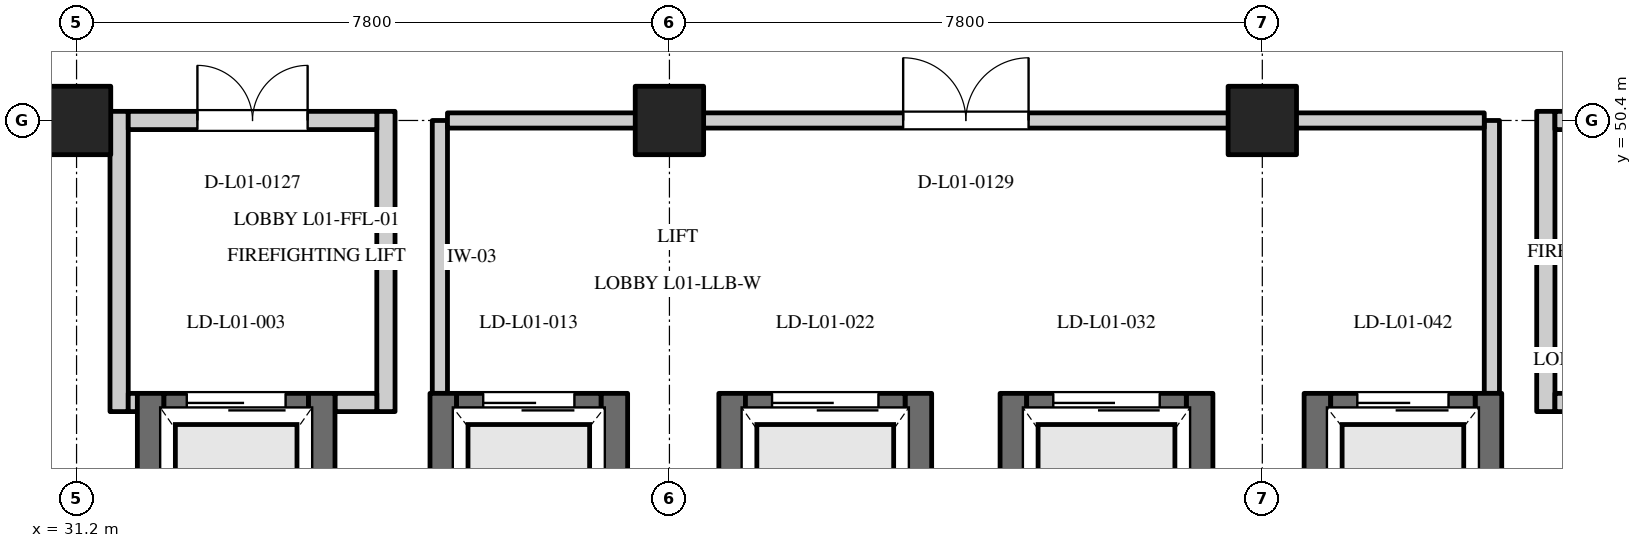
"""IFC4 building model, lengths in metres.
Left out: names, types, materials, properties, quantities, classifications, styles, units other than length and angle.
Written with IfcOpenShell. Run it as: python <this file> out.ifc"""

import sys

from ifc_helpers import new_model, si_unit, direction, frame, frame_2d, origin, origin_2d, place, context, subcontext, project, spatial, rectangle, extrude, element, fill, save


model = new_model("IFC4")
c1 = context("Model", 3, precision=1e-05, world=origin(), true_north=direction((0.0, 1.0)))
c2 = subcontext(c1, "Body", "Model", "MODEL_VIEW")
j1 = project(units=[si_unit("LENGTHUNIT", "METRE"), si_unit("PLANEANGLEUNIT", "RADIAN")], contexts=[c1])
p1 = place(None, origin())
s1 = spatial("IfcSite", under=j1, at=p1, CompositionType="ELEMENT")
p2 = place(p1, origin())
s2 = spatial("IfcBuilding", under=s1, at=p2, CompositionType="ELEMENT")
p3 = place(p2, frame((0.0, 0.0, 4.8)))
s3 = spatial("IfcBuildingStorey", under=s2, at=p3, CompositionType="ELEMENT", Elevation=4.8)
for number, where, z_axis, x_axis in (
    (1, (31.2, 50.4, 0.0), (0.0, 0.0, 1.0), (1.0, 0.0, 0.0)),
    (2, (39.0, 50.4, 0.0), (0.0, 0.0, 1.0), (1.0, 0.0, 0.0)),
    (3, (46.8, 50.4, 0.0), (0.0, 0.0, 1.0), (1.0, 0.0, 0.0)),
):
    element("IfcColumn", number, at=place(p3, frame(where, z_axis=z_axis, x_axis=x_axis)), inside=s3, PredefinedType="COLUMN", context=c2, shape_type="SweptSolid", body=[
        extrude(rectangle(XDim=0.9, YDim=0.9, at=origin_2d()), origin(), (0.0, 0.0, 1.0), 4.8),
    ])
for number, where, z_axis, x_axis in (
    (4, (32.175, 43.06, 0.0), (0.0, 0.0, 1.0), (0.0, 1.0, 0.0)),
    (5, (34.425, 43.06, 0.0), (0.0, 0.0, 1.0), (0.0, 1.0, 0.0)),
):
    element("IfcWall", number, at=place(p3, frame(where, z_axis=z_axis, x_axis=x_axis)), inside=s3, PredefinedType="SHEAR", context=c2, shape_type="SweptSolid", body=[
        extrude(rectangle(XDim=3.75, YDim=0.35, at=frame_2d((1.875, 0.0))), origin(), (0.0, 0.0, 1.0), 4.8),
    ])
p4 = place(p3, frame((32.35, 46.635, 0.0), z_axis=(0.0, 0.0, 1.0), x_axis=(1.0, 0.0, 0.0)))
e6 = element("IfcWall", 6, at=p4, inside=s3, PredefinedType="SHEAR", context=c2, shape_type="SweptSolid", body=[
    extrude(rectangle(XDim=1.9, YDim=0.35, at=frame_2d((0.95, 0.0))), origin(), (0.0, 0.0, 1.0), 4.45),
])
p5 = place(p4, frame((0.3, 0.0, 0.0)))
e7 = element("IfcOpeningElement", 7, at=p5, cuts=e6, PredefinedType="OPENING", context=c2, shape_type="SweptSolid", body=[
    extrude(rectangle(XDim=1.3, YDim=2.2, at=frame_2d((0.65, 1.1))), frame((0.0, 0.187, 0.0), z_axis=(0.0, -1.0, 0.0), x_axis=(1.0, 0.0, 0.0)), (0.0, 0.0, 1.0), 0.374),
])
for number, where, z_axis, x_axis in (
    (8, (36.025, 43.36, 0.0), (0.0, 0.0, 1.0), (0.0, 1.0, 0.0)),
    (9, (38.275, 43.36, 0.0), (0.0, 0.0, 1.0), (0.0, 1.0, 0.0)),
):
    element("IfcWall", number, at=place(p3, frame(where, z_axis=z_axis, x_axis=x_axis)), inside=s3, PredefinedType="SHEAR", context=c2, shape_type="SweptSolid", body=[
        extrude(rectangle(XDim=3.45, YDim=0.35, at=frame_2d((1.725, 0.0))), origin(), (0.0, 0.0, 1.0), 4.8),
    ])
p6 = place(p3, frame((36.2, 46.635, 0.0), z_axis=(0.0, 0.0, 1.0), x_axis=(1.0, 0.0, 0.0)))
e10 = element("IfcWall", 10, at=p6, inside=s3, PredefinedType="SHEAR", context=c2, shape_type="SweptSolid", body=[
    extrude(rectangle(XDim=1.9, YDim=0.35, at=frame_2d((0.95, 0.0))), origin(), (0.0, 0.0, 1.0), 4.45),
])
p7 = place(p6, frame((0.35, 0.0, 0.0)))
e11 = element("IfcOpeningElement", 11, at=p7, cuts=e10, PredefinedType="OPENING", context=c2, shape_type="SweptSolid", body=[
    extrude(rectangle(XDim=1.2, YDim=2.2, at=frame_2d((0.6, 1.1))), frame((0.0, 0.187, 0.0), z_axis=(0.0, -1.0, 0.0), x_axis=(1.0, 0.0, 0.0)), (0.0, 0.0, 1.0), 0.374),
])
for number, where, z_axis, x_axis in (
    (12, (39.825, 42.76, 0.0), (0.0, 0.0, 1.0), (0.0, 1.0, 0.0)),
    (13, (42.275, 42.76, 0.0), (0.0, 0.0, 1.0), (0.0, 1.0, 0.0)),
):
    element("IfcWall", number, at=place(p3, frame(where, z_axis=z_axis, x_axis=x_axis)), inside=s3, PredefinedType="SHEAR", context=c2, shape_type="SweptSolid", body=[
        extrude(rectangle(XDim=4.05, YDim=0.35, at=frame_2d((2.025, 0.0))), origin(), (0.0, 0.0, 1.0), 4.8),
    ])
p8 = place(p3, frame((40.0, 46.635, 0.0), z_axis=(0.0, 0.0, 1.0), x_axis=(1.0, 0.0, 0.0)))
e14 = element("IfcWall", 14, at=p8, inside=s3, PredefinedType="SHEAR", context=c2, shape_type="SweptSolid", body=[
    extrude(rectangle(XDim=2.1, YDim=0.35, at=frame_2d((1.05, 0.0))), origin(), (0.0, 0.0, 1.0), 4.45),
])
p9 = place(p8, frame((0.35, 0.0, 0.0)))
e15 = element("IfcOpeningElement", 15, at=p9, cuts=e14, PredefinedType="OPENING", context=c2, shape_type="SweptSolid", body=[
    extrude(rectangle(XDim=1.4, YDim=2.2, at=frame_2d((0.7, 1.1))), frame((0.0, 0.187, 0.0), z_axis=(0.0, -1.0, 0.0), x_axis=(1.0, 0.0, 0.0)), (0.0, 0.0, 1.0), 0.374),
])
for number, where, z_axis, x_axis in (
    (16, (43.525, 42.76, 0.0), (0.0, 0.0, 1.0), (0.0, 1.0, 0.0)),
    (17, (45.975, 42.76, 0.0), (0.0, 0.0, 1.0), (0.0, 1.0, 0.0)),
):
    element("IfcWall", number, at=place(p3, frame(where, z_axis=z_axis, x_axis=x_axis)), inside=s3, PredefinedType="SHEAR", context=c2, shape_type="SweptSolid", body=[
        extrude(rectangle(XDim=4.05, YDim=0.35, at=frame_2d((2.025, 0.0))), origin(), (0.0, 0.0, 1.0), 4.8),
    ])
p10 = place(p3, frame((43.7, 46.635, 0.0), z_axis=(0.0, 0.0, 1.0), x_axis=(1.0, 0.0, 0.0)))
e18 = element("IfcWall", 18, at=p10, inside=s3, PredefinedType="SHEAR", context=c2, shape_type="SweptSolid", body=[
    extrude(rectangle(XDim=2.1, YDim=0.35, at=frame_2d((1.05, 0.0))), origin(), (0.0, 0.0, 1.0), 4.45),
])
p11 = place(p10, frame((0.35, 0.0, 0.0)))
e19 = element("IfcOpeningElement", 19, at=p11, cuts=e18, PredefinedType="OPENING", context=c2, shape_type="SweptSolid", body=[
    extrude(rectangle(XDim=1.4, YDim=2.2, at=frame_2d((0.7, 1.1))), frame((0.0, 0.187, 0.0), z_axis=(0.0, -1.0, 0.0), x_axis=(1.0, 0.0, 0.0)), (0.0, 0.0, 1.0), 0.374),
])
for number, where, z_axis, x_axis in (
    (20, (47.525, 43.36, 0.0), (0.0, 0.0, 1.0), (0.0, 1.0, 0.0)),
    (21, (49.775, 43.36, 0.0), (0.0, 0.0, 1.0), (0.0, 1.0, 0.0)),
):
    element("IfcWall", number, at=place(p3, frame(where, z_axis=z_axis, x_axis=x_axis)), inside=s3, PredefinedType="SHEAR", context=c2, shape_type="SweptSolid", body=[
        extrude(rectangle(XDim=3.45, YDim=0.35, at=frame_2d((1.725, 0.0))), origin(), (0.0, 0.0, 1.0), 4.8),
    ])
p12 = place(p3, frame((47.7, 46.635, 0.0), z_axis=(0.0, 0.0, 1.0), x_axis=(1.0, 0.0, 0.0)))
e22 = element("IfcWall", 22, at=p12, inside=s3, PredefinedType="SHEAR", context=c2, shape_type="SweptSolid", body=[
    extrude(rectangle(XDim=1.9, YDim=0.35, at=frame_2d((0.95, 0.0))), origin(), (0.0, 0.0, 1.0), 4.45),
])
p13 = place(p12, frame((0.35, 0.0, 0.0)))
e23 = element("IfcOpeningElement", 23, at=p13, cuts=e22, PredefinedType="OPENING", context=c2, shape_type="SweptSolid", body=[
    extrude(rectangle(XDim=1.2, YDim=2.2, at=frame_2d((0.6, 1.1))), frame((0.0, 0.187, 0.0), z_axis=(0.0, -1.0, 0.0), x_axis=(1.0, 0.0, 0.0)), (0.0, 0.0, 1.0), 0.374),
])
for number, where, z_axis, x_axis in (
    (24, (31.76, 46.57, 0.0), (0.0, 0.0, 1.0), (0.0, 1.0, 0.0)),
    (25, (35.27, 46.57, 0.0), (0.0, 0.0, 1.0), (0.0, 1.0, 0.0)),
):
    element("IfcWall", number, at=place(p3, frame(where, z_axis=z_axis, x_axis=x_axis)), inside=s3, PredefinedType="STANDARD", context=c2, shape_type="SweptSolid", body=[
        extrude(rectangle(XDim=3.95, YDim=0.24, at=frame_2d((1.975, 0.0))), origin(), (0.0, 0.0, 1.0), 3.7),
    ])
p14 = place(p3, frame((31.88, 46.69, 0.0), z_axis=(0.0, 0.0, 1.0), x_axis=(1.0, 0.0, 0.0)))
e26 = element("IfcWall", 26, at=p14, inside=s3, PredefinedType="STANDARD", context=c2, shape_type="SweptSolid", body=[
    extrude(rectangle(XDim=0.12, YDim=0.24, at=frame_2d((0.06, 0.0))), origin(), (0.0, 0.0, 1.0), 3.7),
])
p15 = place(p3, frame((34.6, 46.69, 0.0), z_axis=(0.0, 0.0, 1.0), x_axis=(1.0, 0.0, 0.0)))
e27 = element("IfcWall", 27, at=p15, inside=s3, PredefinedType="STANDARD", context=c2, shape_type="SweptSolid", body=[
    extrude(rectangle(XDim=0.55, YDim=0.24, at=frame_2d((0.275, 0.0))), origin(), (0.0, 0.0, 1.0), 3.7),
])
p16 = place(p3, frame((31.88, 50.4, 0.0), z_axis=(0.0, 0.0, 1.0), x_axis=(1.0, 0.0, 0.0)))
e28 = element("IfcWall", 28, at=p16, inside=s3, PredefinedType="STANDARD", context=c2, shape_type="SweptSolid", body=[
    extrude(rectangle(XDim=3.27, YDim=0.24, at=frame_2d((1.635, 0.0))), origin(), (0.0, 0.0, 1.0), 3.7),
])
p17 = place(p16, frame((0.91, 0.0, 0.0)))
e29 = element("IfcOpeningElement", 29, at=p17, cuts=e28, PredefinedType="OPENING", context=c2, shape_type="SweptSolid", body=[
    extrude(rectangle(XDim=1.45, YDim=2.2, at=frame_2d((0.725, 1.1))), frame((0.0, 0.132, 0.0), z_axis=(0.0, -1.0, 0.0), x_axis=(1.0, 0.0, 0.0)), (0.0, 0.0, 1.0), 0.264),
])
p18 = place(p3, frame((50.53, 46.57, 0.0), z_axis=(0.0, 0.0, 1.0), x_axis=(0.0, 1.0, 0.0)))
e30 = element("IfcWall", 30, at=p18, inside=s3, PredefinedType="STANDARD", context=c2, shape_type="SweptSolid", body=[
    extrude(rectangle(XDim=3.95, YDim=0.24, at=frame_2d((1.975, 0.0))), origin(), (0.0, 0.0, 1.0), 3.7),
])
p19 = place(p3, frame((50.65, 46.69, 0.0), z_axis=(0.0, 0.0, 1.0), x_axis=(1.0, 0.0, 0.0)))
e31 = element("IfcWall", 31, at=p19, inside=s3, PredefinedType="STANDARD", context=c2, shape_type="SweptSolid", body=[
    extrude(rectangle(XDim=0.5, YDim=0.24, at=frame_2d((0.25, 0.0))), origin(), (0.0, 0.0, 1.0), 3.7),
])
p20 = place(p3, frame((50.65, 50.4, 0.0), z_axis=(0.0, 0.0, 1.0), x_axis=(1.0, 0.0, 0.0)))
e32 = element("IfcWall", 32, at=p20, inside=s3, PredefinedType="STANDARD", context=c2, shape_type="SweptSolid", body=[
    extrude(rectangle(XDim=3.37, YDim=0.24, at=frame_2d((1.685, 0.0))), origin(), (0.0, 0.0, 1.0), 3.7),
])
p21 = place(p20, frame((0.96, 0.0, 0.0)))
e33 = element("IfcOpeningElement", 33, at=p21, cuts=e32, PredefinedType="OPENING", context=c2, shape_type="SweptSolid", body=[
    extrude(rectangle(XDim=1.45, YDim=2.2, at=frame_2d((0.725, 1.1))), frame((0.0, 0.132, 0.0), z_axis=(0.0, -1.0, 0.0), x_axis=(1.0, 0.0, 0.0)), (0.0, 0.0, 1.0), 0.264),
])
for number, where, z_axis, x_axis in (
    (34, (35.98, 46.81, 0.0), (0.0, 0.0, 1.0), (0.0, 1.0, 0.0)),
    (35, (49.82, 46.81, 0.0), (0.0, 0.0, 1.0), (0.0, 1.0, 0.0)),
):
    element("IfcWall", number, at=place(p3, frame(where, z_axis=z_axis, x_axis=x_axis)), inside=s3, PredefinedType="STANDARD", context=c2, shape_type="SweptSolid", body=[
        extrude(rectangle(XDim=3.59, YDim=0.2, at=frame_2d((1.795, 0.0))), origin(), (0.0, 0.0, 1.0), 3.7),
    ])
p22 = place(p3, frame((36.08, 50.4, 0.0), z_axis=(0.0, 0.0, 1.0), x_axis=(1.0, 0.0, 0.0)))
e36 = element("IfcWall", 36, at=p22, inside=s3, PredefinedType="STANDARD", context=c2, shape_type="SweptSolid", body=[
    extrude(rectangle(XDim=13.64, YDim=0.2, at=frame_2d((6.82, 0.0))), origin(), (0.0, 0.0, 1.0), 3.7),
])
p23 = place(p22, frame((5.995, 0.0, 0.0)))
e37 = element("IfcOpeningElement", 37, at=p23, cuts=e36, PredefinedType="OPENING", context=c2, shape_type="SweptSolid", body=[
    extrude(rectangle(XDim=1.65, YDim=2.25, at=frame_2d((0.825, 1.125))), frame((0.0, 0.112, 0.0), z_axis=(0.0, -1.0, 0.0), x_axis=(1.0, 0.0, 0.0)), (0.0, 0.0, 1.0), 0.224),
])
p24 = place(p5, origin())
e38 = element("IfcDoor", 38, at=p24, inside=s3, OperationType="SLIDING_TO_LEFT", PredefinedType="DOOR", context=c2, shape_type="SweptSolid", body=[
    extrude(rectangle(XDim=1.3, YDim=2.2, at=frame_2d((0.65, 1.1))), frame((0.0, 0.025, 0.0), z_axis=(0.0, -1.0, 0.0), x_axis=(1.0, 0.0, 0.0)), (0.0, 0.0, 1.0), 0.05),
])
fill(e7, e38)
p25 = place(p7, origin())
e39 = element("IfcDoor", 39, at=p25, inside=s3, OperationType="SLIDING_TO_LEFT", PredefinedType="DOOR", context=c2, shape_type="SweptSolid", body=[
    extrude(rectangle(XDim=1.2, YDim=2.2, at=frame_2d((0.6, 1.1))), frame((0.0, 0.025, 0.0), z_axis=(0.0, -1.0, 0.0), x_axis=(1.0, 0.0, 0.0)), (0.0, 0.0, 1.0), 0.05),
])
fill(e11, e39)
p26 = place(p9, origin())
e40 = element("IfcDoor", 40, at=p26, inside=s3, OperationType="SLIDING_TO_LEFT", PredefinedType="DOOR", context=c2, shape_type="SweptSolid", body=[
    extrude(rectangle(XDim=1.4, YDim=2.2, at=frame_2d((0.7, 1.1))), frame((0.0, 0.025, 0.0), z_axis=(0.0, -1.0, 0.0), x_axis=(1.0, 0.0, 0.0)), (0.0, 0.0, 1.0), 0.05),
])
fill(e15, e40)
p27 = place(p11, origin())
e41 = element("IfcDoor", 41, at=p27, inside=s3, OperationType="SLIDING_TO_LEFT", PredefinedType="DOOR", context=c2, shape_type="SweptSolid", body=[
    extrude(rectangle(XDim=1.4, YDim=2.2, at=frame_2d((0.7, 1.1))), frame((0.0, 0.025, 0.0), z_axis=(0.0, -1.0, 0.0), x_axis=(1.0, 0.0, 0.0)), (0.0, 0.0, 1.0), 0.05),
])
fill(e19, e41)
p28 = place(p13, origin())
e42 = element("IfcDoor", 42, at=p28, inside=s3, OperationType="SLIDING_TO_LEFT", PredefinedType="DOOR", context=c2, shape_type="SweptSolid", body=[
    extrude(rectangle(XDim=1.2, YDim=2.2, at=frame_2d((0.6, 1.1))), frame((0.0, 0.025, 0.0), z_axis=(0.0, -1.0, 0.0), x_axis=(1.0, 0.0, 0.0)), (0.0, 0.0, 1.0), 0.05),
])
fill(e23, e42)
p29 = place(p17, origin())
e43 = element("IfcDoor", 43, at=p29, inside=s3, OperationType="DOUBLE_DOOR_SINGLE_SWING", PredefinedType="DOOR", context=c2, shape_type="SweptSolid", body=[
    extrude(rectangle(XDim=1.45, YDim=2.2, at=frame_2d((0.725, 1.1))), frame((0.0, 0.025, 0.0), z_axis=(0.0, -1.0, 0.0), x_axis=(1.0, 0.0, 0.0)), (0.0, 0.0, 1.0), 0.05),
])
fill(e29, e43)
p30 = place(p23, origin())
e44 = element("IfcDoor", 44, at=p30, inside=s3, OperationType="DOUBLE_DOOR_SINGLE_SWING", PredefinedType="DOOR", context=c2, shape_type="SweptSolid", body=[
    extrude(rectangle(XDim=1.65, YDim=2.25, at=frame_2d((0.825, 1.125))), frame((0.0, 0.025, 0.0), z_axis=(0.0, -1.0, 0.0), x_axis=(1.0, 0.0, 0.0)), (0.0, 0.0, 1.0), 0.05),
])
fill(e37, e44)
save(model, sys.argv[1])
